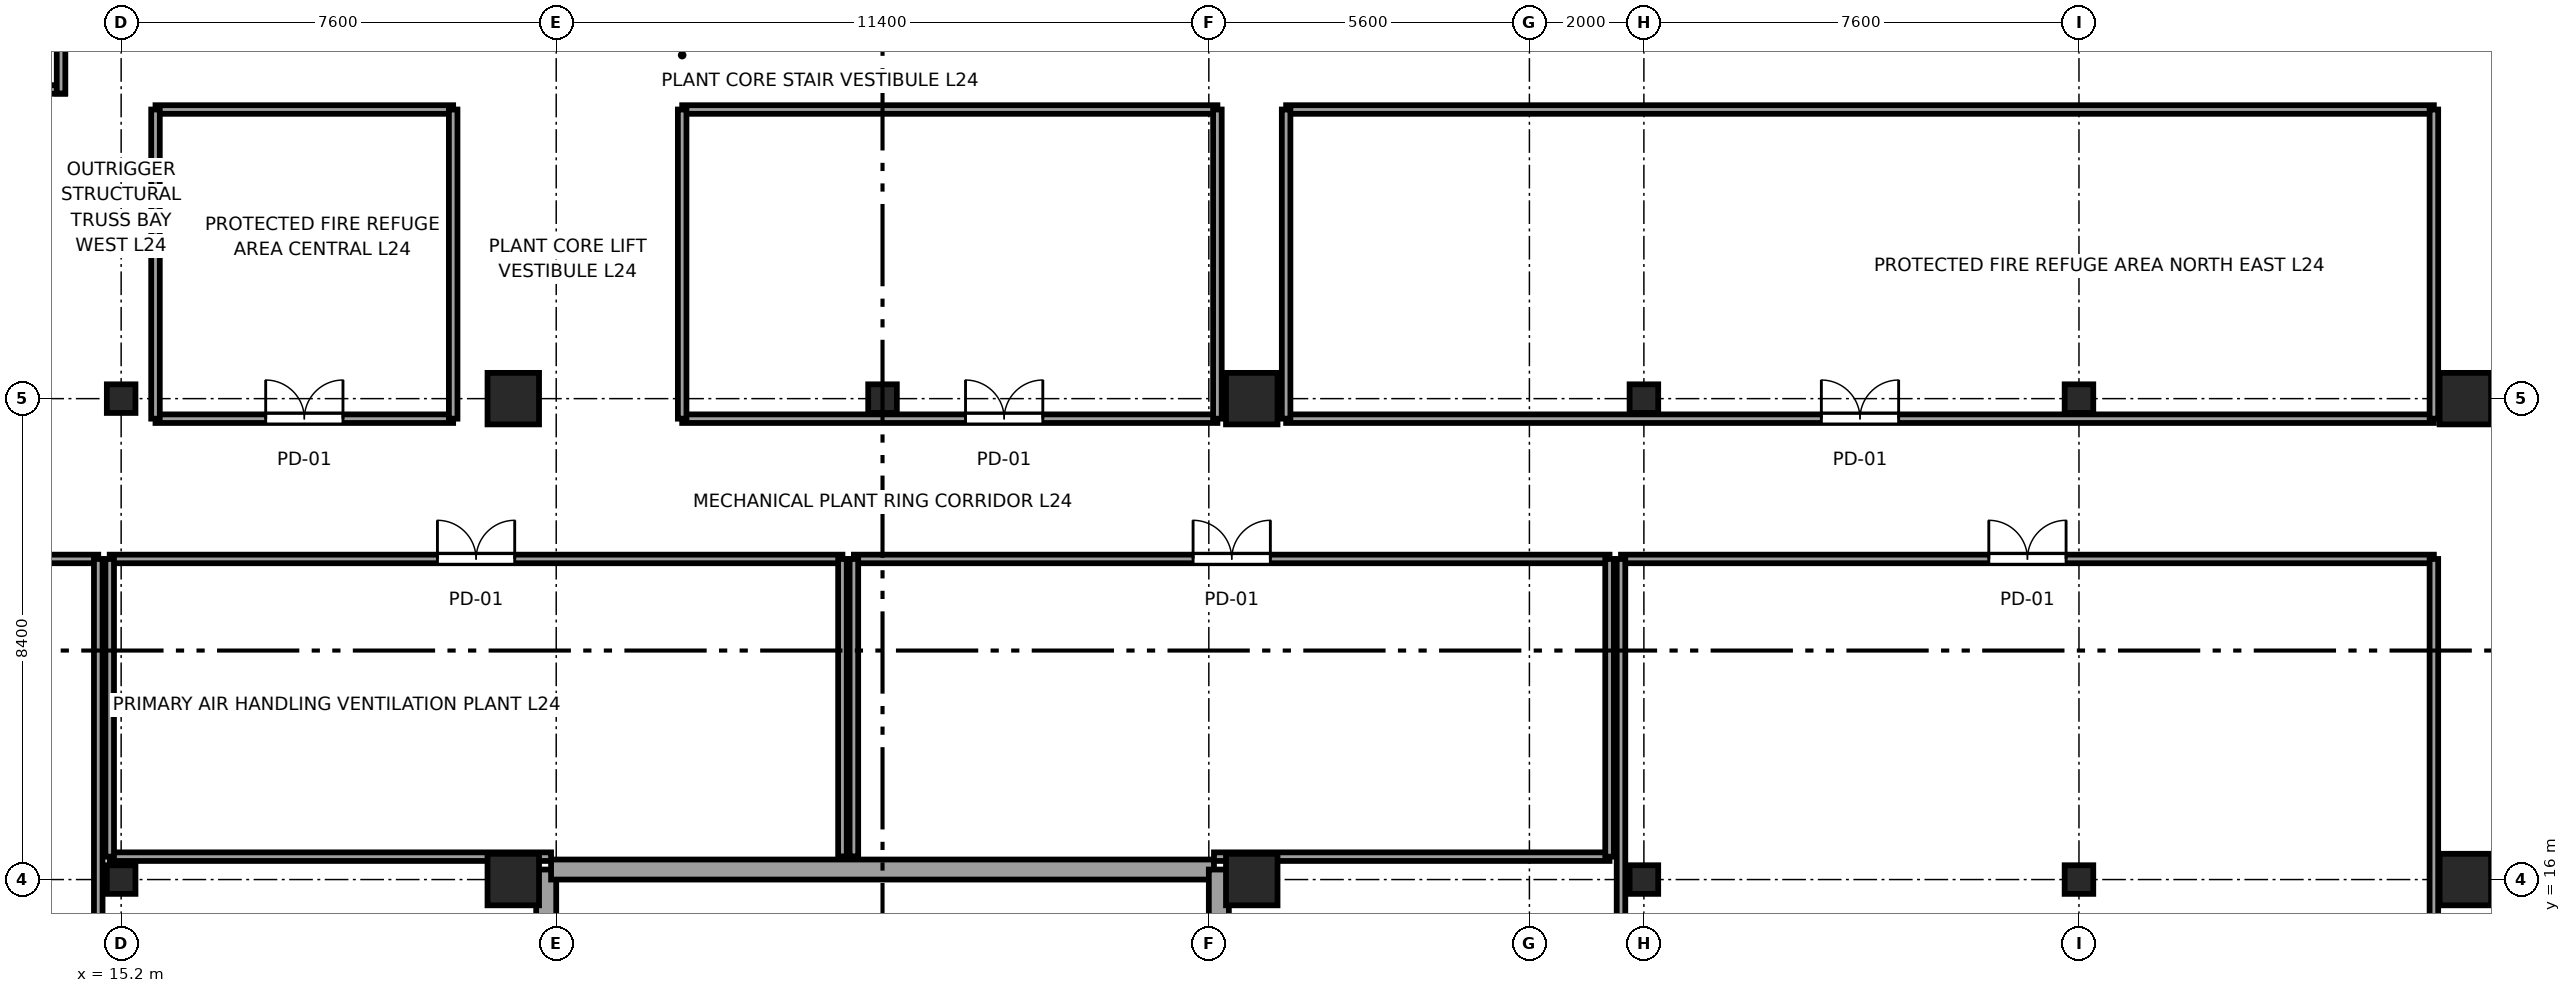
"""IFC4 building model, lengths in metres.
Left out: names, types, materials, properties, quantities, classifications, styles, units other than length and angle.
Written with IfcOpenShell. Run it as: python <this file> out.ifc"""

import sys

from ifc_helpers import new_model, si_unit, direction, frame, frame_2d, origin, origin_2d, place, context, subcontext, project, spatial, rectangle, i_section, extrude, source, transform, mapped, element, fill, save


model = new_model("IFC4")
c1 = context("Model", 3, precision=1e-05, world=origin(), true_north=direction((0.0, 1.0)))
c2 = subcontext(c1, "Body", "Model", "MODEL_VIEW")
j1 = project(units=[si_unit("LENGTHUNIT", "METRE"), si_unit("PLANEANGLEUNIT", "RADIAN")], contexts=[c1])
p1 = place(None, origin())
s1 = spatial("IfcSite", under=j1, at=p1, CompositionType="ELEMENT")
p2 = place(p1, origin())
s2 = spatial("IfcBuilding", under=s1, at=p2, CompositionType="ELEMENT")
p3 = place(p2, frame((0.0, 0.0, 95.9)))
s3 = spatial("IfcBuildingStorey", under=s2, at=p3, CompositionType="ELEMENT", Elevation=95.9)
m1 = source(origin(), c2, "Body", "SweptSolid", [
    extrude(i_section(OverallWidth=0.5, OverallDepth=0.5, WebThickness=0.022, FlangeThickness=0.034, at=origin_2d()), origin(), (0.0, 0.0, 1.0), 5.0),
])
for number, where, z_axis, x_axis in (
    (1, (15.2, 16.0, 0.0), (0.0, 0.0, 1.0), (1.0, 0.0, 0.0)),
    (2, (15.2, 24.4, 0.0), (0.0, 0.0, 1.0), (1.0, 0.0, 0.0)),
):
    element("IfcColumn", number, at=place(p3, frame(where, z_axis=z_axis, x_axis=x_axis)), inside=s3, PredefinedType="COLUMN", context=c2, shape_type="MappedRepresentation", body=[
        mapped(m1, transform((0.0, 0.0, 0.0), x_axis=(1.0, 0.0, 0.0), y_axis=(0.0, 1.0, 0.0), z_axis=(0.0, 0.0, 1.0), scale=1.0)),
    ])
m2 = source(origin(), c2, "Body", "SweptSolid", [
    extrude(rectangle(XDim=0.9, YDim=0.9, at=origin_2d()), origin(), (0.0, 0.0, 1.0), 5.0),
])
for number, where, z_axis, x_axis in (
    (3, (22.05, 16.0, 0.0), (0.0, 0.0, 1.0), (1.0, 0.0, 0.0)),
    (4, (22.05, 24.4, 0.0), (0.0, 0.0, 1.0), (1.0, 0.0, 0.0)),
    (5, (34.95, 16.0, 0.0), (0.0, 0.0, 1.0), (1.0, 0.0, 0.0)),
    (6, (34.95, 24.4, 0.0), (0.0, 0.0, 1.0), (1.0, 0.0, 0.0)),
):
    element("IfcColumn", number, at=place(p3, frame(where, z_axis=z_axis, x_axis=x_axis)), inside=s3, PredefinedType="COLUMN", context=c2, shape_type="MappedRepresentation", body=[
        mapped(m2, transform((0.0, 0.0, 0.0), x_axis=(1.0, 0.0, 0.0), y_axis=(0.0, 1.0, 0.0), z_axis=(0.0, 0.0, 1.0), scale=1.0)),
    ])
for number, where, z_axis, x_axis in (
    (7, (41.8, 16.0, 0.0), (0.0, 0.0, 1.0), (1.0, 0.0, 0.0)),
    (8, (41.8, 24.4, 0.0), (0.0, 0.0, 1.0), (1.0, 0.0, 0.0)),
    (9, (49.4, 16.0, 0.0), (0.0, 0.0, 1.0), (1.0, 0.0, 0.0)),
    (10, (49.4, 24.4, 0.0), (0.0, 0.0, 1.0), (1.0, 0.0, 0.0)),
):
    element("IfcColumn", number, at=place(p3, frame(where, z_axis=z_axis, x_axis=x_axis)), inside=s3, PredefinedType="COLUMN", context=c2, shape_type="MappedRepresentation", body=[
        mapped(m1, transform((0.0, 0.0, 0.0), x_axis=(1.0, 0.0, 0.0), y_axis=(0.0, 1.0, 0.0), z_axis=(0.0, 0.0, 1.0), scale=1.0)),
    ])
for number, where, z_axis, x_axis in (
    (11, (56.15, 16.0, 0.0), (0.0, 0.0, 1.0), (1.0, 0.0, 0.0)),
    (12, (56.15, 24.4, 0.0), (0.0, 0.0, 1.0), (1.0, 0.0, 0.0)),
):
    element("IfcColumn", number, at=place(p3, frame(where, z_axis=z_axis, x_axis=x_axis)), inside=s3, PredefinedType="COLUMN", context=c2, shape_type="MappedRepresentation", body=[
        mapped(m2, transform((0.0, 0.0, 0.0), x_axis=(1.0, 0.0, 0.0), y_axis=(0.0, 1.0, 0.0), z_axis=(0.0, 0.0, 1.0), scale=1.0)),
    ])
p4 = place(p3, frame((28.5, 24.4, 0.0), z_axis=(0.0, 0.0, 1.0), x_axis=(1.0, 0.0, 0.0)))
e13 = element("IfcColumn", 13, at=p4, inside=s3, PredefinedType="COLUMN", context=c2, shape_type="MappedRepresentation", body=[
    mapped(m1, transform((0.0, 0.0, 0.0), x_axis=(1.0, 0.0, 0.0), y_axis=(0.0, 1.0, 0.0), z_axis=(0.0, 0.0, 1.0), scale=1.0)),
])
p5 = place(p3, frame((22.625, 0.175, 0.0), z_axis=(0.0, 0.0, 1.0), x_axis=(0.0, 1.0, 0.0)))
e14 = element("IfcWall", 14, at=p5, inside=s3, PredefinedType="SOLIDWALL", context=c2, shape_type="SweptSolid", body=[
    extrude(rectangle(XDim=16.0, YDim=0.35, at=frame_2d((8.0, 0.0))), origin(), (0.0, 0.0, 1.0), 4.82),
])
p6 = place(p3, frame((22.71, 16.175, 0.0), z_axis=(0.0, 0.0, 1.0), x_axis=(1.0, 0.0, 0.0)))
e15 = element("IfcWall", 15, at=p6, inside=s3, PredefinedType="SOLIDWALL", context=c2, shape_type="SweptSolid", body=[
    extrude(rectangle(XDim=11.58, YDim=0.35, at=frame_2d((5.79, 0.0))), origin(), (0.0, 0.0, 1.0), 4.198),
])
p7 = place(p3, frame((34.375, 16.175, 0.0), z_axis=(0.0, 0.0, 1.0), x_axis=(0.0, -1.0, 0.0)))
e16 = element("IfcWall", 16, at=p7, inside=s3, PredefinedType="SOLIDWALL", context=c2, shape_type="SweptSolid", body=[
    extrude(rectangle(XDim=16.0, YDim=0.35, at=frame_2d((8.0, 0.0))), origin(), (0.0, 0.0, 1.0), 4.82),
])
p8 = place(p3, frame((15.8, 24.05, 0.0), z_axis=(0.0, 0.0, 1.0), x_axis=(1.0, 0.0, 0.0)))
e17 = element("IfcWall", 17, at=p8, inside=s3, PredefinedType="PARTITIONING", context=c2, shape_type="SweptSolid", body=[
    extrude(rectangle(XDim=5.2, YDim=0.15, at=frame_2d((2.6, 0.0))), origin(), (0.0, 0.0, 1.0), 4.82),
])
p9 = place(p8, frame((1.925, 0.0, 0.0)))
e18 = element("IfcOpeningElement", 18, at=p9, cuts=e17, PredefinedType="OPENING", context=c2, shape_type="SweptSolid", body=[
    extrude(rectangle(XDim=1.35, YDim=2.15, at=frame_2d((0.675, 1.075))), frame((0.0, 0.085, 0.0), z_axis=(0.0, -1.0, 0.0), x_axis=(1.0, 0.0, 0.0)), (0.0, 0.0, 1.0), 0.17),
])
p10 = place(p3, frame((15.8, 29.45, 0.0), z_axis=(0.0, 0.0, 1.0), x_axis=(1.0, 0.0, 0.0)))
e19 = element("IfcWall", 19, at=p10, inside=s3, PredefinedType="PARTITIONING", context=c2, shape_type="SweptSolid", body=[
    extrude(rectangle(XDim=5.2, YDim=0.15, at=frame_2d((2.6, 0.0))), origin(), (0.0, 0.0, 1.0), 4.82),
])
for number, where, z_axis, x_axis in (
    (20, (15.8, 24.05, 0.0), (0.0, 0.0, 1.0), (0.0, 1.0, 0.0)),
    (21, (21.0, 24.05, 0.0), (0.0, 0.0, 1.0), (0.0, 1.0, 0.0)),
):
    element("IfcWall", number, at=place(p3, frame(where, z_axis=z_axis, x_axis=x_axis)), inside=s3, PredefinedType="PARTITIONING", context=c2, shape_type="SweptSolid", body=[
        extrude(rectangle(XDim=5.4, YDim=0.15, at=frame_2d((2.7, 0.0))), origin(), (0.0, 0.0, 1.0), 4.82),
    ])
p11 = place(p3, frame((25.0, 24.05, 0.0), z_axis=(0.0, 0.0, 1.0), x_axis=(1.0, 0.0, 0.0)))
e22 = element("IfcWall", 22, at=p11, inside=s3, PredefinedType="PARTITIONING", context=c2, shape_type="SweptSolid", body=[
    extrude(rectangle(XDim=9.35, YDim=0.15, at=frame_2d((4.675, 0.0))), origin(), (0.0, 0.0, 1.0), 4.82),
])
p12 = place(p11, frame((4.95, 0.0, 0.0)))
e23 = element("IfcOpeningElement", 23, at=p12, cuts=e22, PredefinedType="OPENING", context=c2, shape_type="SweptSolid", body=[
    extrude(rectangle(XDim=1.35, YDim=2.15, at=frame_2d((0.675, 1.075))), frame((0.0, 0.085, 0.0), z_axis=(0.0, -1.0, 0.0), x_axis=(1.0, 0.0, 0.0)), (0.0, 0.0, 1.0), 0.17),
])
p13 = place(p3, frame((25.0, 29.45, 0.0), z_axis=(0.0, 0.0, 1.0), x_axis=(1.0, 0.0, 0.0)))
e24 = element("IfcWall", 24, at=p13, inside=s3, PredefinedType="PARTITIONING", context=c2, shape_type="SweptSolid", body=[
    extrude(rectangle(XDim=9.35, YDim=0.15, at=frame_2d((4.675, 0.0))), origin(), (0.0, 0.0, 1.0), 4.82),
])
for number, where, z_axis, x_axis in (
    (25, (25.0, 24.05, 0.0), (0.0, 0.0, 1.0), (0.0, 1.0, 0.0)),
    (26, (34.35, 24.05, 0.0), (0.0, 0.0, 1.0), (0.0, 1.0, 0.0)),
):
    element("IfcWall", number, at=place(p3, frame(where, z_axis=z_axis, x_axis=x_axis)), inside=s3, PredefinedType="PARTITIONING", context=c2, shape_type="SweptSolid", body=[
        extrude(rectangle(XDim=5.4, YDim=0.15, at=frame_2d((2.7, 0.0))), origin(), (0.0, 0.0, 1.0), 4.82),
    ])
p14 = place(p3, frame((35.55, 24.05, 0.0), z_axis=(0.0, 0.0, 1.0), x_axis=(1.0, 0.0, 0.0)))
e27 = element("IfcWall", 27, at=p14, inside=s3, PredefinedType="PARTITIONING", context=c2, shape_type="SweptSolid", body=[
    extrude(rectangle(XDim=20.05, YDim=0.15, at=frame_2d((10.025, 0.0))), origin(), (0.0, 0.0, 1.0), 4.82),
])
p15 = place(p14, frame((9.35, 0.0, 0.0)))
e28 = element("IfcOpeningElement", 28, at=p15, cuts=e27, PredefinedType="OPENING", context=c2, shape_type="SweptSolid", body=[
    extrude(rectangle(XDim=1.35, YDim=2.15, at=frame_2d((0.675, 1.075))), frame((0.0, 0.085, 0.0), z_axis=(0.0, -1.0, 0.0), x_axis=(1.0, 0.0, 0.0)), (0.0, 0.0, 1.0), 0.17),
])
p16 = place(p3, frame((35.55, 29.45, 0.0), z_axis=(0.0, 0.0, 1.0), x_axis=(1.0, 0.0, 0.0)))
e29 = element("IfcWall", 29, at=p16, inside=s3, PredefinedType="PARTITIONING", context=c2, shape_type="SweptSolid", body=[
    extrude(rectangle(XDim=20.05, YDim=0.15, at=frame_2d((10.025, 0.0))), origin(), (0.0, 0.0, 1.0), 4.82),
])
for number, where, z_axis, x_axis in (
    (30, (35.55, 24.05, 0.0), (0.0, 0.0, 1.0), (0.0, 1.0, 0.0)),
    (31, (55.6, 24.05, 0.0), (0.0, 0.0, 1.0), (0.0, 1.0, 0.0)),
):
    element("IfcWall", number, at=place(p3, frame(where, z_axis=z_axis, x_axis=x_axis)), inside=s3, PredefinedType="PARTITIONING", context=c2, shape_type="SweptSolid", body=[
        extrude(rectangle(XDim=5.4, YDim=0.15, at=frame_2d((2.7, 0.0))), origin(), (0.0, 0.0, 1.0), 4.82),
    ])
p17 = place(p3, frame((9.83, 29.8, 0.0), z_axis=(0.0, 0.0, 1.0), x_axis=(1.0, 0.0, 0.0)))
e32 = element("IfcWall", 32, at=p17, inside=s3, PredefinedType="PARTITIONING", context=c2, shape_type="SweptSolid", body=[
    extrude(rectangle(XDim=4.39, YDim=0.15, at=frame_2d((2.195, 0.0))), origin(), (0.0, 0.0, 1.0), 4.82),
])
p18 = place(p3, frame((14.15, 29.73, 0.0), z_axis=(0.0, 0.0, 1.0), x_axis=(0.0, 1.0, 0.0)))
e33 = element("IfcWall", 33, at=p18, inside=s3, PredefinedType="PARTITIONING", context=c2, shape_type="SweptSolid", body=[
    extrude(rectangle(XDim=1.815, YDim=0.15, at=frame_2d((0.907, 0.0))), origin(), (0.0, 0.0, 1.0), 4.82),
])
p19 = place(p3, frame((1.4, 21.6, 0.0), z_axis=(0.0, 0.0, 1.0), x_axis=(1.0, 0.0, 0.0)))
e34 = element("IfcWall", 34, at=p19, inside=s3, PredefinedType="PARTITIONING", context=c2, shape_type="SweptSolid", body=[
    extrude(rectangle(XDim=13.4, YDim=0.15, at=frame_2d((6.7, 0.0))), origin(), (0.0, 0.0, 1.0), 4.82),
])
p20 = place(p19, frame((6.025, 0.0, 0.0)))
e35 = element("IfcOpeningElement", 35, at=p20, cuts=e34, PredefinedType="OPENING", context=c2, shape_type="SweptSolid", body=[
    extrude(rectangle(XDim=1.35, YDim=2.15, at=frame_2d((0.675, 1.075))), frame((0.0, 0.085, 0.0), z_axis=(0.0, -1.0, 0.0), x_axis=(1.0, 0.0, 0.0)), (0.0, 0.0, 1.0), 0.17),
])
p21 = place(p3, frame((14.8, 0.405, 0.0), z_axis=(0.0, 0.0, 1.0), x_axis=(0.0, 1.0, 0.0)))
e36 = element("IfcWall", 36, at=p21, inside=s3, PredefinedType="PARTITIONING", context=c2, shape_type="SweptSolid", body=[
    extrude(rectangle(XDim=21.195, YDim=0.15, at=frame_2d((10.598, 0.0))), origin(), (0.0, 0.0, 1.0), 4.82),
])
p22 = place(p3, frame((15.0, 16.4, 0.0), z_axis=(0.0, 0.0, 1.0), x_axis=(1.0, 0.0, 0.0)))
e37 = element("IfcWall", 37, at=p22, inside=s3, PredefinedType="PARTITIONING", context=c2, shape_type="SweptSolid", body=[
    extrude(rectangle(XDim=7.71, YDim=0.15, at=frame_2d((3.855, 0.0))), origin(), (0.0, 0.0, 1.0), 4.82),
])
p23 = place(p3, frame((15.0, 21.6, 0.0), z_axis=(0.0, 0.0, 1.0), x_axis=(1.0, 0.0, 0.0)))
e38 = element("IfcWall", 38, at=p23, inside=s3, PredefinedType="PARTITIONING", context=c2, shape_type="SweptSolid", body=[
    extrude(rectangle(XDim=12.8, YDim=0.15, at=frame_2d((6.4, 0.0))), origin(), (0.0, 0.0, 1.0), 4.82),
])
p24 = place(p23, frame((5.725, 0.0, 0.0)))
e39 = element("IfcOpeningElement", 39, at=p24, cuts=e38, PredefinedType="OPENING", context=c2, shape_type="SweptSolid", body=[
    extrude(rectangle(XDim=1.35, YDim=2.15, at=frame_2d((0.675, 1.075))), frame((0.0, 0.085, 0.0), z_axis=(0.0, -1.0, 0.0), x_axis=(1.0, 0.0, 0.0)), (0.0, 0.0, 1.0), 0.17),
])
p25 = place(p3, frame((15.0, 16.4, 0.0), z_axis=(0.0, 0.0, 1.0), x_axis=(0.0, 1.0, 0.0)))
e40 = element("IfcWall", 40, at=p25, inside=s3, PredefinedType="PARTITIONING", context=c2, shape_type="SweptSolid", body=[
    extrude(rectangle(XDim=5.2, YDim=0.15, at=frame_2d((2.6, 0.0))), origin(), (0.0, 0.0, 1.0), 4.82),
])
p26 = place(p3, frame((27.8, 16.405, 0.0), z_axis=(0.0, 0.0, 1.0), x_axis=(0.0, 1.0, 0.0)))
e41 = element("IfcWall", 41, at=p26, inside=s3, PredefinedType="PARTITIONING", context=c2, shape_type="SweptSolid", body=[
    extrude(rectangle(XDim=5.195, YDim=0.15, at=frame_2d((2.598, 0.0))), origin(), (0.0, 0.0, 1.0), 4.82),
])
p27 = place(p3, frame((34.29, 16.4, 0.0), z_axis=(0.0, 0.0, 1.0), x_axis=(1.0, 0.0, 0.0)))
e42 = element("IfcWall", 42, at=p27, inside=s3, PredefinedType="PARTITIONING", context=c2, shape_type="SweptSolid", body=[
    extrude(rectangle(XDim=6.91, YDim=0.15, at=frame_2d((3.455, 0.0))), origin(), (0.0, 0.0, 1.0), 4.82),
])
p28 = place(p3, frame((28.0, 21.6, 0.0), z_axis=(0.0, 0.0, 1.0), x_axis=(1.0, 0.0, 0.0)))
e43 = element("IfcWall", 43, at=p28, inside=s3, PredefinedType="PARTITIONING", context=c2, shape_type="SweptSolid", body=[
    extrude(rectangle(XDim=13.2, YDim=0.15, at=frame_2d((6.6, 0.0))), origin(), (0.0, 0.0, 1.0), 4.82),
])
p29 = place(p28, frame((5.925, 0.0, 0.0)))
e44 = element("IfcOpeningElement", 44, at=p29, cuts=e43, PredefinedType="OPENING", context=c2, shape_type="SweptSolid", body=[
    extrude(rectangle(XDim=1.35, YDim=2.15, at=frame_2d((0.675, 1.075))), frame((0.0, 0.085, 0.0), z_axis=(0.0, -1.0, 0.0), x_axis=(1.0, 0.0, 0.0)), (0.0, 0.0, 1.0), 0.17),
])
p30 = place(p3, frame((28.0, 16.405, 0.0), z_axis=(0.0, 0.0, 1.0), x_axis=(0.0, 1.0, 0.0)))
e45 = element("IfcWall", 45, at=p30, inside=s3, PredefinedType="PARTITIONING", context=c2, shape_type="SweptSolid", body=[
    extrude(rectangle(XDim=5.195, YDim=0.15, at=frame_2d((2.598, 0.0))), origin(), (0.0, 0.0, 1.0), 4.82),
])
p31 = place(p3, frame((41.2, 16.4, 0.0), z_axis=(0.0, 0.0, 1.0), x_axis=(0.0, 1.0, 0.0)))
e46 = element("IfcWall", 46, at=p31, inside=s3, PredefinedType="PARTITIONING", context=c2, shape_type="SweptSolid", body=[
    extrude(rectangle(XDim=5.2, YDim=0.15, at=frame_2d((2.6, 0.0))), origin(), (0.0, 0.0, 1.0), 4.82),
])
p32 = place(p3, frame((41.4, 21.6, 0.0), z_axis=(0.0, 0.0, 1.0), x_axis=(1.0, 0.0, 0.0)))
e47 = element("IfcWall", 47, at=p32, inside=s3, PredefinedType="PARTITIONING", context=c2, shape_type="SweptSolid", body=[
    extrude(rectangle(XDim=14.2, YDim=0.15, at=frame_2d((7.1, 0.0))), origin(), (0.0, 0.0, 1.0), 4.82),
])
p33 = place(p32, frame((6.425, 0.0, 0.0)))
e48 = element("IfcOpeningElement", 48, at=p33, cuts=e47, PredefinedType="OPENING", context=c2, shape_type="SweptSolid", body=[
    extrude(rectangle(XDim=1.35, YDim=2.15, at=frame_2d((0.675, 1.075))), frame((0.0, 0.085, 0.0), z_axis=(0.0, -1.0, 0.0), x_axis=(1.0, 0.0, 0.0)), (0.0, 0.0, 1.0), 0.17),
])
p34 = place(p3, frame((41.4, 0.405, 0.0), z_axis=(0.0, 0.0, 1.0), x_axis=(0.0, 1.0, 0.0)))
e49 = element("IfcWall", 49, at=p34, inside=s3, PredefinedType="PARTITIONING", context=c2, shape_type="SweptSolid", body=[
    extrude(rectangle(XDim=21.195, YDim=0.15, at=frame_2d((10.598, 0.0))), origin(), (0.0, 0.0, 1.0), 4.82),
])
p35 = place(p3, frame((55.6, 2.908, 0.0), z_axis=(0.0, 0.0, 1.0), x_axis=(0.0, 1.0, 0.0)))
e50 = element("IfcWall", 50, at=p35, inside=s3, PredefinedType="PARTITIONING", context=c2, shape_type="SweptSolid", body=[
    extrude(rectangle(XDim=18.692, YDim=0.15, at=frame_2d((9.346, 0.0))), origin(), (0.0, 0.0, 1.0), 4.282),
])
m3 = source(origin(), c2, "Body", "SweptSolid", [
    extrude(rectangle(XDim=1.35, YDim=2.15, at=frame_2d((0.675, 1.075))), frame((0.0, 0.025, 0.0), z_axis=(0.0, -1.0, 0.0), x_axis=(1.0, 0.0, 0.0)), (0.0, 0.0, 1.0), 0.05),
])
p36 = place(p9, origin())
e51 = element("IfcDoor", 51, at=p36, inside=s3, OperationType="DOUBLE_DOOR_SINGLE_SWING", PredefinedType="DOOR", context=c2, shape_type="MappedRepresentation", body=[
    mapped(m3, transform((0.0, 0.0, 0.0), x_axis=(1.0, 0.0, 0.0), y_axis=(0.0, 1.0, 0.0), z_axis=(0.0, 0.0, 1.0), scale=1.0)),
])
fill(e18, e51)
p37 = place(p12, origin())
e52 = element("IfcDoor", 52, at=p37, inside=s3, OperationType="DOUBLE_DOOR_SINGLE_SWING", PredefinedType="DOOR", context=c2, shape_type="MappedRepresentation", body=[
    mapped(m3, transform((0.0, 0.0, 0.0), x_axis=(1.0, 0.0, 0.0), y_axis=(0.0, 1.0, 0.0), z_axis=(0.0, 0.0, 1.0), scale=1.0)),
])
fill(e23, e52)
p38 = place(p15, origin())
e53 = element("IfcDoor", 53, at=p38, inside=s3, OperationType="DOUBLE_DOOR_SINGLE_SWING", PredefinedType="DOOR", context=c2, shape_type="MappedRepresentation", body=[
    mapped(m3, transform((0.0, 0.0, 0.0), x_axis=(1.0, 0.0, 0.0), y_axis=(0.0, 1.0, 0.0), z_axis=(0.0, 0.0, 1.0), scale=1.0)),
])
fill(e28, e53)
p39 = place(p24, origin())
e54 = element("IfcDoor", 54, at=p39, inside=s3, OperationType="DOUBLE_DOOR_SINGLE_SWING", PredefinedType="DOOR", context=c2, shape_type="MappedRepresentation", body=[
    mapped(m3, transform((0.0, 0.0, 0.0), x_axis=(1.0, 0.0, 0.0), y_axis=(0.0, 1.0, 0.0), z_axis=(0.0, 0.0, 1.0), scale=1.0)),
])
fill(e39, e54)
p40 = place(p29, origin())
e55 = element("IfcDoor", 55, at=p40, inside=s3, OperationType="DOUBLE_DOOR_SINGLE_SWING", PredefinedType="DOOR", context=c2, shape_type="MappedRepresentation", body=[
    mapped(m3, transform((0.0, 0.0, 0.0), x_axis=(1.0, 0.0, 0.0), y_axis=(0.0, 1.0, 0.0), z_axis=(0.0, 0.0, 1.0), scale=1.0)),
])
fill(e44, e55)
p41 = place(p33, origin())
e56 = element("IfcDoor", 56, at=p41, inside=s3, OperationType="DOUBLE_DOOR_SINGLE_SWING", PredefinedType="DOOR", context=c2, shape_type="MappedRepresentation", body=[
    mapped(m3, transform((0.0, 0.0, 0.0), x_axis=(1.0, 0.0, 0.0), y_axis=(0.0, 1.0, 0.0), z_axis=(0.0, 0.0, 1.0), scale=1.0)),
])
fill(e48, e56)
save(model, sys.argv[1])
